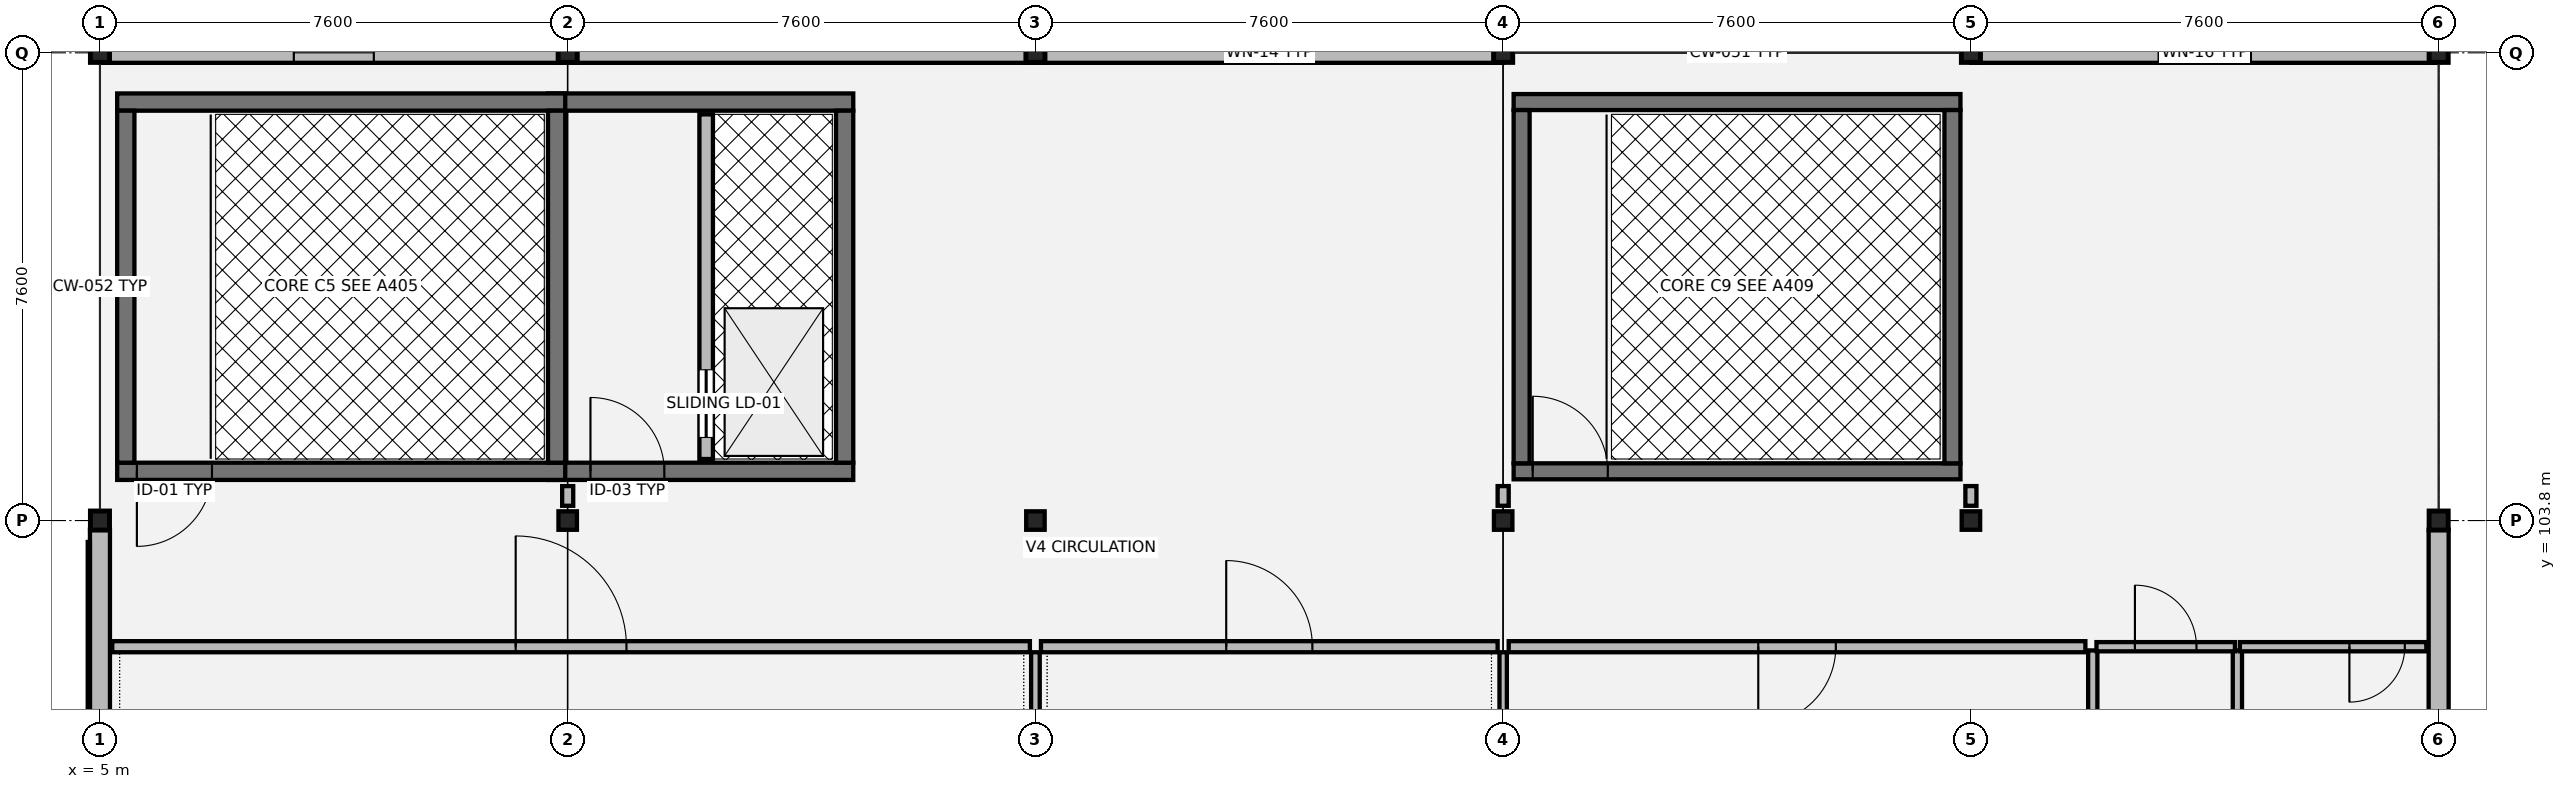
"""IFC4 building model, lengths in metres.
Left out: names, types, materials, properties, quantities, classifications, styles, units other than length and angle.
Written with IfcOpenShell. Run it as: python <this file> out.ifc"""

import sys

from ifc_helpers import new_model, si_unit, direction, frame, frame_2d, origin, origin_2d, place, context, subcontext, project, spatial, rectangle, i_section, extrude, element, fill, save


model = new_model("IFC4")
c1 = context("Model", 3, precision=1e-05, world=origin(), true_north=direction((0.0, 1.0)))
c2 = subcontext(c1, "Body", "Model", "MODEL_VIEW")
j1 = project(units=[si_unit("LENGTHUNIT", "METRE"), si_unit("PLANEANGLEUNIT", "RADIAN")], contexts=[c1])
p1 = place(None, origin())
s1 = spatial("IfcSite", under=j1, at=p1, CompositionType="ELEMENT")
p2 = place(p1, origin())
s2 = spatial("IfcBuilding", under=s1, at=p2, CompositionType="ELEMENT")
p3 = place(p2, frame((0.0, 0.0, 13.26)))
s3 = spatial("IfcBuildingStorey", under=s2, at=p3, CompositionType="ELEMENT", Elevation=13.26)
for number, where, z_axis, x_axis in (
    (1, (5.0, 103.8, 0.0), (0.0, 0.0, 1.0), (1.0, 0.0, 0.0)),
    (2, (5.0, 111.4, 0.0), (0.0, 0.0, 1.0), (1.0, 0.0, 0.0)),
    (3, (12.6, 103.8, 0.0), (0.0, 0.0, 1.0), (1.0, 0.0, 0.0)),
    (4, (12.6, 111.4, 0.0), (0.0, 0.0, 1.0), (1.0, 0.0, 0.0)),
    (5, (20.2, 103.8, 0.0), (0.0, 0.0, 1.0), (1.0, 0.0, 0.0)),
    (6, (20.2, 111.4, 0.0), (0.0, 0.0, 1.0), (1.0, 0.0, 0.0)),
    (7, (27.8, 103.8, 0.0), (0.0, 0.0, 1.0), (1.0, 0.0, 0.0)),
    (8, (27.8, 111.4, 0.0), (0.0, 0.0, 1.0), (1.0, 0.0, 0.0)),
    (9, (35.4, 103.8, 0.0), (0.0, 0.0, 1.0), (1.0, 0.0, 0.0)),
    (10, (35.4, 111.4, 0.0), (0.0, 0.0, 1.0), (1.0, 0.0, 0.0)),
    (11, (43.0, 103.8, 0.0), (0.0, 0.0, 1.0), (1.0, 0.0, 0.0)),
    (12, (43.0, 111.4, 0.0), (0.0, 0.0, 1.0), (1.0, 0.0, 0.0)),
):
    element("IfcColumn", number, at=place(p3, frame(where, z_axis=z_axis, x_axis=x_axis)), inside=s3, PredefinedType="COLUMN", context=c2, shape_type="SweptSolid", body=[
        extrude(i_section(OverallWidth=0.3, OverallDepth=0.3, WebThickness=0.011, FlangeThickness=0.019, at=origin_2d()), origin(), (0.0, 0.0, 1.0), 3.87),
    ])
p4 = place(p3, frame((43.0, 96.348, 0.0), z_axis=(0.0, 0.0, 1.0), x_axis=(0.0, 1.0, 0.0)))
e13 = element("IfcWall", 13, at=p4, inside=s3, PredefinedType="SOLIDWALL", context=c2, shape_type="SweptSolid", body=[
    extrude(rectangle(XDim=7.304, YDim=0.325, at=frame_2d((3.652, 0.0))), origin(), (0.0, 0.0, 1.0), 3.48),
])
p5 = place(p3, frame((42.996, 111.4, 0.0), z_axis=(0.0, 0.0, 1.0), x_axis=(-1.0, 0.0, 0.0)))
e14 = element("IfcWall", 14, at=p5, inside=s3, PredefinedType="SOLIDWALL", context=c2, shape_type="SweptSolid", body=[
    extrude(rectangle(XDim=7.592, YDim=0.325, at=frame_2d((3.796, 0.0))), origin(), (0.0, 0.0, 1.0), 3.48),
])
p6 = place(p5, frame((3.046, 0.0, 0.8)))
e15 = element("IfcOpeningElement", 15, at=p6, cuts=e14, PredefinedType="OPENING", context=c2, shape_type="SweptSolid", body=[
    extrude(rectangle(XDim=1.5, YDim=2.18, at=frame_2d((0.75, 1.09))), frame((0.0, 0.172, 0.0), z_axis=(0.0, -1.0, 0.0), x_axis=(1.0, 0.0, 0.0)), (0.0, 0.0, 1.0), 0.345),
])
p7 = place(p3, frame((27.796, 111.4, 0.0), z_axis=(0.0, 0.0, 1.0), x_axis=(-1.0, 0.0, 0.0)))
e16 = element("IfcWall", 16, at=p7, inside=s3, PredefinedType="SOLIDWALL", context=c2, shape_type="SweptSolid", body=[
    extrude(rectangle(XDim=7.592, YDim=0.325, at=frame_2d((3.796, 0.0))), origin(), (0.0, 0.0, 1.0), 3.48),
])
p8 = place(p7, frame((3.246, 0.0, 0.8)))
e17 = element("IfcOpeningElement", 17, at=p8, cuts=e16, PredefinedType="OPENING", context=c2, shape_type="SweptSolid", body=[
    extrude(rectangle(XDim=1.1, YDim=2.05, at=frame_2d((0.55, 1.025))), frame((0.0, 0.172, 0.0), z_axis=(0.0, -1.0, 0.0), x_axis=(1.0, 0.0, 0.0)), (0.0, 0.0, 1.0), 0.345),
])
p9 = place(p3, frame((20.196, 111.4, 0.0), z_axis=(0.0, 0.0, 1.0), x_axis=(-1.0, 0.0, 0.0)))
e18 = element("IfcWall", 18, at=p9, inside=s3, PredefinedType="SOLIDWALL", context=c2, shape_type="SweptSolid", body=[
    extrude(rectangle(XDim=7.592, YDim=0.325, at=frame_2d((3.796, 0.0))), origin(), (0.0, 0.0, 1.0), 3.48),
])
p10 = place(p3, frame((12.596, 111.4, 0.0), z_axis=(0.0, 0.0, 1.0), x_axis=(-1.0, 0.0, 0.0)))
e19 = element("IfcWall", 19, at=p10, inside=s3, PredefinedType="SOLIDWALL", context=c2, shape_type="SweptSolid", body=[
    extrude(rectangle(XDim=7.592, YDim=0.325, at=frame_2d((3.796, 0.0))), origin(), (0.0, 0.0, 1.0), 3.48),
])
p11 = place(p10, frame((3.146, 0.0, 0.8)))
e20 = element("IfcOpeningElement", 20, at=p11, cuts=e19, PredefinedType="OPENING", context=c2, shape_type="SweptSolid", body=[
    extrude(rectangle(XDim=1.3, YDim=2.12, at=frame_2d((0.65, 1.06))), frame((0.0, 0.172, 0.0), z_axis=(0.0, -1.0, 0.0), x_axis=(1.0, 0.0, 0.0)), (0.0, 0.0, 1.0), 0.345),
])
p12 = place(p3, frame((5.0, 103.652, 0.0), z_axis=(0.0, 0.0, 1.0), x_axis=(0.0, -1.0, 0.0)))
e21 = element("IfcWall", 21, at=p12, inside=s3, PredefinedType="SOLIDWALL", context=c2, shape_type="SweptSolid", body=[
    extrude(rectangle(XDim=7.304, YDim=0.325, at=frame_2d((3.652, 0.0))), origin(), (0.0, 0.0, 1.0), 3.48),
])
p13 = place(p3, frame((12.28, 104.6, 0.0), z_axis=(0.0, 0.0, 1.0), x_axis=(1.0, 0.0, 0.0)))
e22 = element("IfcWall", 22, at=p13, inside=s3, PredefinedType="SHEAR", context=c2, shape_type="SweptSolid", body=[
    extrude(rectangle(XDim=4.96, YDim=0.28, at=frame_2d((2.48, 0.0))), origin(), (0.0, 0.0, 1.0), 3.845),
])
p14 = place(p13, frame((0.69, 0.0, 0.0)))
e23 = element("IfcOpeningElement", 23, at=p14, cuts=e22, PredefinedType="OPENING", context=c2, shape_type="SweptSolid", body=[
    extrude(rectangle(XDim=1.2, YDim=2.16, at=frame_2d((0.6, 1.08))), frame((0.0, 0.15, 0.0), z_axis=(0.0, -1.0, 0.0), x_axis=(1.0, 0.0, 0.0)), (0.0, 0.0, 1.0), 0.3),
])
p15 = place(p3, frame((17.24, 110.6, 0.0), z_axis=(0.0, 0.0, 1.0), x_axis=(-1.0, 0.0, 0.0)))
e24 = element("IfcWall", 24, at=p15, inside=s3, PredefinedType="SHEAR", context=c2, shape_type="SweptSolid", body=[
    extrude(rectangle(XDim=4.96, YDim=0.28, at=frame_2d((2.48, 0.0))), origin(), (0.0, 0.0, 1.0), 3.845),
])
p16 = place(p3, frame((17.1, 104.74, 0.0), z_axis=(0.0, 0.0, 1.0), x_axis=(0.0, 1.0, 0.0)))
e25 = element("IfcWall", 25, at=p16, inside=s3, PredefinedType="SHEAR", context=c2, shape_type="SweptSolid", body=[
    extrude(rectangle(XDim=5.72, YDim=0.28, at=frame_2d((2.86, 0.0))), origin(), (0.0, 0.0, 1.0), 3.845),
])
p17 = place(p3, frame((14.85, 104.8, 0.0), z_axis=(0.0, 0.0, 1.0), x_axis=(0.0, 1.0, 0.0)))
e26 = element("IfcWall", 26, at=p17, inside=s3, PredefinedType="SOLIDWALL", context=c2, shape_type="SweptSolid", body=[
    extrude(rectangle(XDim=5.6, YDim=0.22, at=frame_2d((2.8, 0.0))), origin(), (0.0, 0.0, 1.0), 3.845),
])
p18 = place(p17, frame((0.35, 0.0, 0.0)))
e27 = element("IfcOpeningElement", 27, at=p18, cuts=e26, PredefinedType="OPENING", context=c2, shape_type="SweptSolid", body=[
    extrude(rectangle(XDim=1.1, YDim=2.15, at=frame_2d((0.55, 1.075))), frame((0.0, 0.12, 0.0), z_axis=(0.0, -1.0, 0.0), x_axis=(1.0, 0.0, 0.0)), (0.0, 0.0, 1.0), 0.24),
])
p19 = place(p3, frame((5.28, 104.6, 0.0), z_axis=(0.0, 0.0, 1.0), x_axis=(1.0, 0.0, 0.0)))
e28 = element("IfcWall", 28, at=p19, inside=s3, PredefinedType="SHEAR", context=c2, shape_type="SweptSolid", body=[
    extrude(rectangle(XDim=7.28, YDim=0.28, at=frame_2d((3.64, 0.0))), origin(), (0.0, 0.0, 1.0), 3.845),
])
p20 = place(p19, frame((0.32, 0.0, 0.0)))
e29 = element("IfcOpeningElement", 29, at=p20, cuts=e28, PredefinedType="OPENING", context=c2, shape_type="SweptSolid", body=[
    extrude(rectangle(XDim=1.22, YDim=2.18, at=frame_2d((0.61, 1.09))), frame((0.0, 0.15, 0.0), z_axis=(0.0, -1.0, 0.0), x_axis=(1.0, 0.0, 0.0)), (0.0, 0.0, 1.0), 0.3),
])
p21 = place(p3, frame((5.28, 110.6, 0.0), z_axis=(0.0, 0.0, 1.0), x_axis=(1.0, 0.0, 0.0)))
e30 = element("IfcWall", 30, at=p21, inside=s3, PredefinedType="SHEAR", context=c2, shape_type="SweptSolid", body=[
    extrude(rectangle(XDim=7.28, YDim=0.28, at=frame_2d((3.64, 0.0))), origin(), (0.0, 0.0, 1.0), 3.845),
])
for number, where, z_axis, x_axis in (
    (31, (5.42, 104.74, 0.0), (0.0, 0.0, 1.0), (0.0, 1.0, 0.0)),
    (32, (12.42, 104.74, 0.0), (0.0, 0.0, 1.0), (0.0, 1.0, 0.0)),
):
    element("IfcWall", number, at=place(p3, frame(where, z_axis=z_axis, x_axis=x_axis)), inside=s3, PredefinedType="SHEAR", context=c2, shape_type="SweptSolid", body=[
        extrude(rectangle(XDim=5.72, YDim=0.28, at=frame_2d((2.86, 0.0))), origin(), (0.0, 0.0, 1.0), 3.845),
    ])
p22 = place(p3, frame((27.97, 104.6, 0.0), z_axis=(0.0, 0.0, 1.0), x_axis=(1.0, 0.0, 0.0)))
e33 = element("IfcWall", 33, at=p22, inside=s3, PredefinedType="SHEAR", context=c2, shape_type="SweptSolid", body=[
    extrude(rectangle(XDim=7.26, YDim=0.26, at=frame_2d((3.63, 0.0))), origin(), (0.0, 0.0, 1.0), 3.845),
])
p23 = place(p22, frame((0.31, 0.0, 0.0)))
e34 = element("IfcOpeningElement", 34, at=p23, cuts=e33, PredefinedType="OPENING", context=c2, shape_type="SweptSolid", body=[
    extrude(rectangle(XDim=1.22, YDim=2.18, at=frame_2d((0.61, 1.09))), frame((0.0, 0.14, 0.0), z_axis=(0.0, -1.0, 0.0), x_axis=(1.0, 0.0, 0.0)), (0.0, 0.0, 1.0), 0.28),
])
p24 = place(p3, frame((27.97, 110.6, 0.0), z_axis=(0.0, 0.0, 1.0), x_axis=(1.0, 0.0, 0.0)))
e35 = element("IfcWall", 35, at=p24, inside=s3, PredefinedType="SHEAR", context=c2, shape_type="SweptSolid", body=[
    extrude(rectangle(XDim=7.26, YDim=0.26, at=frame_2d((3.63, 0.0))), origin(), (0.0, 0.0, 1.0), 3.845),
])
for number, where, z_axis, x_axis in (
    (36, (28.1, 104.73, 0.0), (0.0, 0.0, 1.0), (0.0, 1.0, 0.0)),
    (37, (35.1, 104.73, 0.0), (0.0, 0.0, 1.0), (0.0, 1.0, 0.0)),
):
    element("IfcWall", number, at=place(p3, frame(where, z_axis=z_axis, x_axis=x_axis)), inside=s3, PredefinedType="SHEAR", context=c2, shape_type="SweptSolid", body=[
        extrude(rectangle(XDim=5.74, YDim=0.26, at=frame_2d((2.87, 0.0))), origin(), (0.0, 0.0, 1.0), 3.845),
    ])
for number, where, z_axis, x_axis in (
    (38, (37.38, 99.33, 0.0), (0.0, 0.0, 1.0), (0.0, 1.0, 0.0)),
    (39, (39.73, 99.33, 0.0), (0.0, 0.0, 1.0), (0.0, 1.0, 0.0)),
):
    element("IfcWall", number, at=place(p3, frame(where, z_axis=z_axis, x_axis=x_axis)), inside=s3, PredefinedType="PARTITIONING", context=c2, shape_type="SweptSolid", body=[
        extrude(rectangle(XDim=2.36, YDim=0.15, at=frame_2d((1.18, 0.0))), origin(), (0.0, 0.0, 1.0), 3.18),
    ])
p25 = place(p3, frame((37.44, 101.75, 0.0), z_axis=(0.0, 0.0, 1.0), x_axis=(1.0, 0.0, 0.0)))
e40 = element("IfcWall", 40, at=p25, inside=s3, PredefinedType="PARTITIONING", context=c2, shape_type="SweptSolid", body=[
    extrude(rectangle(XDim=2.25, YDim=0.15, at=frame_2d((1.125, 0.0))), origin(), (0.0, 0.0, 1.0), 3.18),
])
p26 = place(p25, frame((0.625, 0.0, 0.0)))
e41 = element("IfcOpeningElement", 41, at=p26, cuts=e40, PredefinedType="OPENING", context=c2, shape_type="SweptSolid", body=[
    extrude(rectangle(XDim=1.0, YDim=2.15, at=frame_2d((0.5, 1.075))), frame((0.0, 0.085, 0.0), z_axis=(0.0, -1.0, 0.0), x_axis=(1.0, 0.0, 0.0)), (0.0, 0.0, 1.0), 0.17),
])
p27 = place(p3, frame((39.77, 101.75, 0.0), z_axis=(0.0, 0.0, 1.0), x_axis=(1.0, 0.0, 0.0)))
e42 = element("IfcWall", 42, at=p27, inside=s3, PredefinedType="PARTITIONING", context=c2, shape_type="SweptSolid", body=[
    extrude(rectangle(XDim=3.03, YDim=0.15, at=frame_2d((1.515, 0.0))), origin(), (0.0, 0.0, 1.0), 3.18),
])
p28 = place(p27, frame((1.78, 0.0, 0.0)))
e43 = element("IfcOpeningElement", 43, at=p28, cuts=e42, PredefinedType="OPENING", context=c2, shape_type="SweptSolid", body=[
    extrude(rectangle(XDim=0.9, YDim=2.15, at=frame_2d((0.45, 1.075))), frame((0.0, 0.085, 0.0), z_axis=(0.0, -1.0, 0.0), x_axis=(1.0, 0.0, 0.0)), (0.0, 0.0, 1.0), 0.17),
])
p29 = place(p3, frame((5.2, 101.75, 0.0), z_axis=(0.0, 0.0, 1.0), x_axis=(1.0, 0.0, 0.0)))
e44 = element("IfcWall", 44, at=p29, inside=s3, PredefinedType="PARTITIONING", context=c2, shape_type="SweptSolid", body=[
    extrude(rectangle(XDim=14.91, YDim=0.18, at=frame_2d((7.455, 0.0))), origin(), (0.0, 0.0, 1.0), 3.18),
])
p30 = place(p29, frame((6.555, 0.0, 0.0)))
e45 = element("IfcOpeningElement", 45, at=p30, cuts=e44, PredefinedType="OPENING", context=c2, shape_type="SweptSolid", body=[
    extrude(rectangle(XDim=1.8, YDim=2.3, at=frame_2d((0.9, 1.15))), frame((0.0, 0.1, 0.0), z_axis=(0.0, -1.0, 0.0), x_axis=(1.0, 0.0, 0.0)), (0.0, 0.0, 1.0), 0.2),
])
p31 = place(p3, frame((20.29, 101.75, 0.0), z_axis=(0.0, 0.0, 1.0), x_axis=(1.0, 0.0, 0.0)))
e46 = element("IfcWall", 46, at=p31, inside=s3, PredefinedType="PARTITIONING", context=c2, shape_type="SweptSolid", body=[
    extrude(rectangle(XDim=7.42, YDim=0.18, at=frame_2d((3.71, 0.0))), origin(), (0.0, 0.0, 1.0), 3.18),
])
p32 = place(p31, frame((3.01, 0.0, 0.0)))
e47 = element("IfcOpeningElement", 47, at=p32, cuts=e46, PredefinedType="OPENING", context=c2, shape_type="SweptSolid", body=[
    extrude(rectangle(XDim=1.4, YDim=2.22, at=frame_2d((0.7, 1.11))), frame((0.0, 0.1, 0.0), z_axis=(0.0, -1.0, 0.0), x_axis=(1.0, 0.0, 0.0)), (0.0, 0.0, 1.0), 0.2),
])
p33 = place(p3, frame((27.89, 101.75, 0.0), z_axis=(0.0, 0.0, 1.0), x_axis=(1.0, 0.0, 0.0)))
e48 = element("IfcWall", 48, at=p33, inside=s3, PredefinedType="PARTITIONING", context=c2, shape_type="SweptSolid", body=[
    extrude(rectangle(XDim=9.37, YDim=0.18, at=frame_2d((4.685, 0.0))), origin(), (0.0, 0.0, 1.0), 3.18),
])
p34 = place(p33, frame((4.055, 0.0, 0.0)))
e49 = element("IfcOpeningElement", 49, at=p34, cuts=e48, PredefinedType="OPENING", context=c2, shape_type="SweptSolid", body=[
    extrude(rectangle(XDim=1.26, YDim=2.2, at=frame_2d((0.63, 1.1))), frame((0.0, 0.1, 0.0), z_axis=(0.0, -1.0, 0.0), x_axis=(1.0, 0.0, 0.0)), (0.0, 0.0, 1.0), 0.2),
])
for number, where, z_axis, x_axis in (
    (50, (12.6, 104.04, 0.0), (0.0, 0.0, 1.0), (0.0, 1.0, 0.0)),
    (51, (27.8, 104.04, 0.0), (0.0, 0.0, 1.0), (0.0, 1.0, 0.0)),
    (52, (35.4, 104.04, 0.0), (0.0, 0.0, 1.0), (0.0, 1.0, 0.0)),
):
    element("IfcWall", number, at=place(p3, frame(where, z_axis=z_axis, x_axis=x_axis)), inside=s3, PredefinedType="PARTITIONING", context=c2, shape_type="SweptSolid", body=[
        extrude(rectangle(XDim=0.32, YDim=0.18, at=frame_2d((0.16, 0.0))), origin(), (0.0, 0.0, 1.0), 3.18),
    ])
p35 = place(p3, frame((20.2, 81.32, 0.0), z_axis=(0.0, 0.0, 1.0), x_axis=(0.0, 1.0, 0.0)))
e53 = element("IfcWall", 53, at=p35, inside=s3, PredefinedType="PARTITIONING", context=c2, shape_type="SweptSolid", body=[
    extrude(rectangle(XDim=20.34, YDim=0.14, at=frame_2d((10.17, 0.0))), origin(), (0.0, 0.0, 1.0), 3.18),
])
p36 = place(p3, frame((27.8, 81.32, 0.0), z_axis=(0.0, 0.0, 1.0), x_axis=(0.0, 1.0, 0.0)))
e54 = element("IfcWall", 54, at=p36, inside=s3, PredefinedType="PARTITIONING", context=c2, shape_type="SweptSolid", body=[
    extrude(rectangle(XDim=20.34, YDim=0.12, at=frame_2d((10.17, 0.0))), origin(), (0.0, 0.0, 1.0), 3.18),
])
p37 = place(p6, origin())
e55 = element("IfcWindow", 55, at=p37, inside=s3, PartitioningType="SINGLE_PANEL", PredefinedType="WINDOW", context=c2, shape_type="SweptSolid", body=[
    extrude(rectangle(XDim=1.5, YDim=2.18, at=frame_2d((0.75, 1.09))), frame((0.0, 0.03, 0.0), z_axis=(0.0, -1.0, 0.0), x_axis=(1.0, 0.0, 0.0)), (0.0, 0.0, 1.0), 0.06),
])
fill(e15, e55)
p38 = place(p8, origin())
e56 = element("IfcWindow", 56, at=p38, inside=s3, PartitioningType="SINGLE_PANEL", PredefinedType="WINDOW", context=c2, shape_type="SweptSolid", body=[
    extrude(rectangle(XDim=1.1, YDim=2.05, at=frame_2d((0.55, 1.025))), frame((0.0, 0.03, 0.0), z_axis=(0.0, -1.0, 0.0), x_axis=(1.0, 0.0, 0.0)), (0.0, 0.0, 1.0), 0.06),
])
fill(e17, e56)
p39 = place(p11, origin())
e57 = element("IfcWindow", 57, at=p39, inside=s3, PartitioningType="SINGLE_PANEL", PredefinedType="WINDOW", context=c2, shape_type="SweptSolid", body=[
    extrude(rectangle(XDim=1.3, YDim=2.12, at=frame_2d((0.65, 1.06))), frame((0.0, 0.03, 0.0), z_axis=(0.0, -1.0, 0.0), x_axis=(1.0, 0.0, 0.0)), (0.0, 0.0, 1.0), 0.06),
])
fill(e20, e57)
p40 = place(p14, origin())
e58 = element("IfcDoor", 58, at=p40, inside=s3, OperationType="SINGLE_SWING_LEFT", PredefinedType="DOOR", context=c2, shape_type="SweptSolid", body=[
    extrude(rectangle(XDim=1.2, YDim=2.16, at=frame_2d((0.6, 1.08))), frame((0.0, 0.025, 0.0), z_axis=(0.0, -1.0, 0.0), x_axis=(1.0, 0.0, 0.0)), (0.0, 0.0, 1.0), 0.05),
])
fill(e23, e58)
p41 = place(p18, origin())
e59 = element("IfcDoor", 59, at=p41, inside=s3, OperationType="SLIDING_TO_LEFT", PredefinedType="DOOR", context=c2, shape_type="SweptSolid", body=[
    extrude(rectangle(XDim=1.1, YDim=2.15, at=frame_2d((0.55, 1.075))), frame((0.0, 0.025, 0.0), z_axis=(0.0, -1.0, 0.0), x_axis=(1.0, 0.0, 0.0)), (0.0, 0.0, 1.0), 0.05),
])
fill(e27, e59)
p42 = place(p20, origin())
e60 = element("IfcDoor", 60, at=p42, inside=s3, OperationType="SINGLE_SWING_RIGHT", PredefinedType="DOOR", context=c2, shape_type="SweptSolid", body=[
    extrude(rectangle(XDim=1.22, YDim=2.18, at=frame_2d((0.61, 1.09))), frame((0.0, 0.025, 0.0), z_axis=(0.0, -1.0, 0.0), x_axis=(1.0, 0.0, 0.0)), (0.0, 0.0, 1.0), 0.05),
])
fill(e29, e60)
p43 = place(p23, origin())
e61 = element("IfcDoor", 61, at=p43, inside=s3, OperationType="SINGLE_SWING_LEFT", PredefinedType="DOOR", context=c2, shape_type="SweptSolid", body=[
    extrude(rectangle(XDim=1.22, YDim=2.18, at=frame_2d((0.61, 1.09))), frame((0.0, 0.025, 0.0), z_axis=(0.0, -1.0, 0.0), x_axis=(1.0, 0.0, 0.0)), (0.0, 0.0, 1.0), 0.05),
])
fill(e34, e61)
p44 = place(p26, origin())
e62 = element("IfcDoor", 62, at=p44, inside=s3, OperationType="SINGLE_SWING_LEFT", PredefinedType="DOOR", context=c2, shape_type="SweptSolid", body=[
    extrude(rectangle(XDim=1.0, YDim=2.15, at=frame_2d((0.5, 1.075))), frame((0.0, 0.025, 0.0), z_axis=(0.0, -1.0, 0.0), x_axis=(1.0, 0.0, 0.0)), (0.0, 0.0, 1.0), 0.05),
])
fill(e41, e62)
p45 = place(p28, origin())
e63 = element("IfcDoor", 63, at=p45, inside=s3, OperationType="SINGLE_SWING_RIGHT", PredefinedType="DOOR", context=c2, shape_type="SweptSolid", body=[
    extrude(rectangle(XDim=0.9, YDim=2.15, at=frame_2d((0.45, 1.075))), frame((0.0, 0.025, 0.0), z_axis=(0.0, -1.0, 0.0), x_axis=(1.0, 0.0, 0.0)), (0.0, 0.0, 1.0), 0.05),
])
fill(e43, e63)
p46 = place(p30, origin())
e64 = element("IfcDoor", 64, at=p46, inside=s3, OperationType="DOUBLE_DOOR_SINGLE_SWING", PredefinedType="DOOR", context=c2, shape_type="SweptSolid", body=[
    extrude(rectangle(XDim=1.8, YDim=2.3, at=frame_2d((0.9, 1.15))), frame((0.0, 0.025, 0.0), z_axis=(0.0, -1.0, 0.0), x_axis=(1.0, 0.0, 0.0)), (0.0, 0.0, 1.0), 0.05),
])
fill(e45, e64)
p47 = place(p32, origin())
e65 = element("IfcDoor", 65, at=p47, inside=s3, OperationType="SINGLE_SWING_LEFT", PredefinedType="DOOR", context=c2, shape_type="SweptSolid", body=[
    extrude(rectangle(XDim=1.4, YDim=2.22, at=frame_2d((0.7, 1.11))), frame((0.0, 0.025, 0.0), z_axis=(0.0, -1.0, 0.0), x_axis=(1.0, 0.0, 0.0)), (0.0, 0.0, 1.0), 0.05),
])
fill(e47, e65)
p48 = place(p34, origin())
e66 = element("IfcDoor", 66, at=p48, inside=s3, OperationType="SINGLE_SWING_RIGHT", PredefinedType="DOOR", context=c2, shape_type="SweptSolid", body=[
    extrude(rectangle(XDim=1.26, YDim=2.2, at=frame_2d((0.63, 1.1))), frame((0.0, 0.025, 0.0), z_axis=(0.0, -1.0, 0.0), x_axis=(1.0, 0.0, 0.0)), (0.0, 0.0, 1.0), 0.05),
])
fill(e49, e66)
save(model, sys.argv[1])
